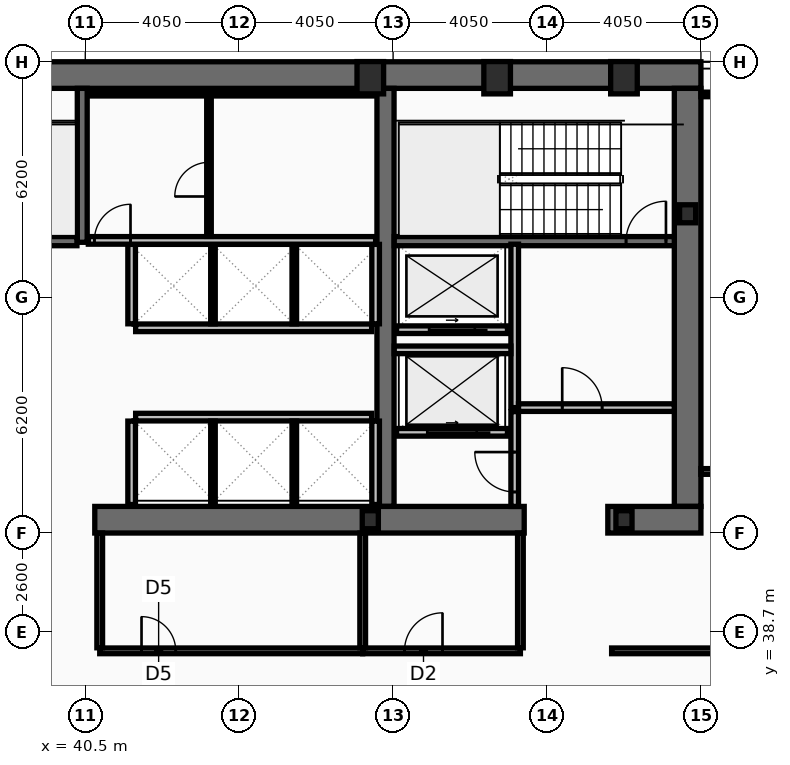
"""IFC4 building model, lengths in metres.
Left out: names, types, materials, properties, quantities, classifications, styles, units other than length and angle.
Written with IfcOpenShell. Run it as: python <this file> out.ifc"""

import sys

from ifc_helpers import new_model, si_unit, direction, frame, frame_2d, origin, origin_2d, place, context, subcontext, project, spatial, rectangle, hollow_rectangle, i_section, extrude, element, fill, save


model = new_model("IFC4")
c1 = context("Model", 3, precision=1e-05, world=origin(), true_north=direction((0.0, 1.0)))
c2 = subcontext(c1, "Body", "Model", "MODEL_VIEW")
j1 = project(units=[si_unit("LENGTHUNIT", "METRE"), si_unit("PLANEANGLEUNIT", "RADIAN")], contexts=[c1])
p1 = place(None, origin())
s1 = spatial("IfcSite", under=j1, at=p1, CompositionType="ELEMENT")
p2 = place(p1, origin())
s2 = spatial("IfcBuilding", under=s1, at=p2, CompositionType="ELEMENT")
p3 = place(p2, frame((0.0, 0.0, 102.6)))
s3 = spatial("IfcBuildingStorey", under=s2, at=p3, CompositionType="ELEMENT", Elevation=102.6)
p4 = place(p3, frame((16.2, 53.35, 0.0), z_axis=(0.0, 0.0, 1.0), x_axis=(1.0, 0.0, 0.0)))
e1 = element("IfcWall", 1, at=p4, inside=s3, PredefinedType="SHEAR", context=c2, shape_type="SweptSolid", body=[
    extrude(rectangle(XDim=40.5, YDim=0.7, at=frame_2d((20.25, 0.0))), origin(), (0.0, 0.0, 1.0), 3.8),
])
p5 = place(p3, frame((56.35, 53.0, 0.0), z_axis=(0.0, 0.0, 1.0), x_axis=(0.0, -1.0, 0.0)))
e2 = element("IfcWall", 2, at=p5, inside=s3, PredefinedType="SHEAR", context=c2, shape_type="SweptSolid", body=[
    extrude(rectangle(XDim=11.0, YDim=0.7, at=frame_2d((5.5, 0.0))), origin(), (0.0, 0.0, 1.0), 3.8),
])
p6 = place(p3, frame((48.4, 42.0, 0.0), z_axis=(0.0, 0.0, 1.0), x_axis=(0.0, 1.0, 0.0)))
e3 = element("IfcWall", 3, at=p6, inside=s3, PredefinedType="SHEAR", context=c2, shape_type="SweptSolid", body=[
    extrude(rectangle(XDim=11.0, YDim=0.45, at=frame_2d((5.5, 0.0))), origin(), (0.0, 0.0, 1.0), 3.8),
])
p7 = place(p3, frame((52.05, 41.65, 0.0), z_axis=(0.0, 0.0, 1.0), x_axis=(-1.0, 0.0, 0.0)))
e4 = element("IfcWall", 4, at=p7, inside=s3, PredefinedType="SHEAR", context=c2, shape_type="SweptSolid", body=[
    extrude(rectangle(XDim=11.3, YDim=0.7, at=frame_2d((5.65, 0.0))), origin(), (0.0, 0.0, 1.0), 3.8),
])
p8 = place(p3, frame((56.7, 41.65, 0.0), z_axis=(0.0, 0.0, 1.0), x_axis=(-1.0, 0.0, 0.0)))
e5 = element("IfcWall", 5, at=p8, inside=s3, PredefinedType="SHEAR", context=c2, shape_type="SweptSolid", body=[
    extrude(rectangle(XDim=2.45, YDim=0.7, at=frame_2d((1.225, 0.0))), origin(), (0.0, 0.0, 1.0), 3.8),
])
p9 = place(p3, frame((40.42, 48.95, 0.0), z_axis=(0.0, 0.0, 1.0), x_axis=(0.0, 1.0, 0.0)))
e6 = element("IfcWall", 6, at=p9, inside=s3, PredefinedType="SHEAR", context=c2, shape_type="SweptSolid", body=[
    extrude(rectangle(XDim=4.05, YDim=0.26, at=frame_2d((2.025, 0.0))), origin(), (0.0, 0.0, 1.0), 3.8),
])
p10 = place(p3, frame((48.63, 48.98, 0.0), z_axis=(0.0, 0.0, 1.0), x_axis=(1.0, 0.0, 0.0)))
e7 = element("IfcWall", 7, at=p10, inside=s3, PredefinedType="SHEAR", context=c2, shape_type="SweptSolid", body=[
    extrude(rectangle(XDim=7.37, YDim=0.24, at=frame_2d((3.685, 0.0))), origin(), (0.0, 0.0, 1.0), 3.8),
])
p11 = place(p10, frame((6.1, 0.0, 0.0)))
e8 = element("IfcOpeningElement", 8, at=p11, cuts=e7, PredefinedType="OPENING", context=c2, shape_type="SweptSolid", body=[
    extrude(rectangle(XDim=1.05, YDim=2.15, at=frame_2d((0.525, 1.075))), frame((0.0, 0.13, 0.0), z_axis=(0.0, -1.0, 0.0), x_axis=(1.0, 0.0, 0.0)), (0.0, 0.0, 1.0), 0.26),
])
p12 = place(p3, frame((32.72, 48.98, 0.0), z_axis=(0.0, 0.0, 1.0), x_axis=(1.0, 0.0, 0.0)))
e9 = element("IfcWall", 9, at=p12, inside=s3, PredefinedType="SHEAR", context=c2, shape_type="SweptSolid", body=[
    extrude(rectangle(XDim=7.56, YDim=0.24, at=frame_2d((3.78, 0.0))), origin(), (0.0, 0.0, 1.0), 3.8),
])
p13 = place(p12, frame((0.22, 0.0, 0.0)))
e10 = element("IfcOpeningElement", 10, at=p13, cuts=e9, PredefinedType="OPENING", context=c2, shape_type="SweptSolid", body=[
    extrude(rectangle(XDim=1.05, YDim=2.15, at=frame_2d((0.525, 1.075))), frame((0.0, 0.13, 0.0), z_axis=(0.0, -1.0, 0.0), x_axis=(1.0, 0.0, 0.0)), (0.0, 0.0, 1.0), 0.26),
])
for number, where, z_axis, x_axis in (
    (11, (48.0, 53.28, 0.0), (0.0, 0.0, 1.0), (1.0, 0.0, 0.0)),
    (12, (51.337, 53.28, 0.0), (0.0, 0.0, 1.0), (1.0, 0.0, 0.0)),
    (13, (54.675, 53.28, 0.0), (0.0, 0.0, 1.0), (1.0, 0.0, 0.0)),
):
    element("IfcColumn", number, at=place(p3, frame(where, z_axis=z_axis, x_axis=x_axis)), inside=s3, PredefinedType="COLUMN", context=c2, shape_type="SweptSolid", body=[
        extrude(hollow_rectangle(XDim=0.7, YDim=0.85, WallThickness=0.05, at=origin_2d()), origin(), (0.0, 0.0, 1.0), 4.0),
    ])
for number, where, z_axis, x_axis in (
    (14, (56.35, 49.7, 0.0), (0.0, 0.0, 1.0), (1.0, 0.0, 0.0)),
    (15, (48.0, 41.65, 0.0), (0.0, 0.0, 1.0), (1.0, 0.0, 0.0)),
    (16, (54.675, 41.65, 0.0), (0.0, 0.0, 1.0), (1.0, 0.0, 0.0)),
):
    element("IfcColumn", number, at=place(p3, frame(where, z_axis=z_axis, x_axis=x_axis)), inside=s3, PredefinedType="COLUMN", context=c2, shape_type="SweptSolid", body=[
        extrude(i_section(OverallWidth=0.424, OverallDepth=0.474, WebThickness=0.048, FlangeThickness=0.077, at=origin_2d()), origin(), (0.0, 0.0, 1.0), 4.0),
    ])
p14 = place(p3, frame((51.61, 43.95, 0.0), z_axis=(0.0, 0.0, 1.0), x_axis=(-1.0, 0.0, 0.0)))
e17 = element("IfcWall", 17, at=p14, inside=s3, PredefinedType="PARTITIONING", context=c2, shape_type="SweptSolid", body=[
    extrude(rectangle(XDim=2.92, YDim=0.2, at=frame_2d((1.46, 0.0))), origin(), (0.0, 0.0, 1.0), 3.8),
])
p15 = place(p14, frame((0.81, 0.0, 0.0)))
e18 = element("IfcOpeningElement", 18, at=p15, cuts=e17, PredefinedType="OPENING", context=c2, shape_type="SweptSolid", body=[
    extrude(rectangle(XDim=1.3, YDim=2.18, at=frame_2d((0.65, 1.09))), frame((0.0, 0.11, 0.0), z_axis=(0.0, -1.0, 0.0), x_axis=(1.0, 0.0, 0.0)), (0.0, 0.0, 1.0), 0.22),
])
p16 = place(p3, frame((51.61, 46.65, 0.0), z_axis=(0.0, 0.0, 1.0), x_axis=(-1.0, 0.0, 0.0)))
e19 = element("IfcWall", 19, at=p16, inside=s3, PredefinedType="PARTITIONING", context=c2, shape_type="SweptSolid", body=[
    extrude(rectangle(XDim=2.92, YDim=0.2, at=frame_2d((1.46, 0.0))), origin(), (0.0, 0.0, 1.0), 3.8),
])
p17 = place(p16, frame((0.86, 0.0, 0.0)))
e20 = element("IfcOpeningElement", 20, at=p17, cuts=e19, PredefinedType="OPENING", context=c2, shape_type="SweptSolid", body=[
    extrude(rectangle(XDim=1.2, YDim=2.18, at=frame_2d((0.6, 1.09))), frame((0.0, 0.11, 0.0), z_axis=(0.0, -1.0, 0.0), x_axis=(1.0, 0.0, 0.0)), (0.0, 0.0, 1.0), 0.22),
])
p18 = place(p3, frame((51.8, 44.6, 0.0), z_axis=(0.0, 0.0, 1.0), x_axis=(0.0, 1.0, 0.0)))
e21 = element("IfcWall", 21, at=p18, inside=s3, PredefinedType="PARTITIONING", context=c2, shape_type="SweptSolid", body=[
    extrude(rectangle(XDim=4.3, YDim=0.2, at=frame_2d((2.15, 0.0))), origin(), (0.0, 0.0, 1.0), 3.8),
])
p19 = place(p3, frame((51.9, 44.6, 0.0), z_axis=(0.0, 0.0, 1.0), x_axis=(1.0, 0.0, 0.0)))
e22 = element("IfcWall", 22, at=p19, inside=s3, PredefinedType="PARTITIONING", context=c2, shape_type="SweptSolid", body=[
    extrude(rectangle(XDim=4.1, YDim=0.2, at=frame_2d((2.05, 0.0))), origin(), (0.0, 0.0, 1.0), 3.8),
])
p20 = place(p19, frame((1.15, 0.0, 0.0)))
e23 = element("IfcOpeningElement", 23, at=p20, cuts=e22, PredefinedType="OPENING", context=c2, shape_type="SweptSolid", body=[
    extrude(rectangle(XDim=1.05, YDim=2.15, at=frame_2d((0.525, 1.075))), frame((0.0, 0.11, 0.0), z_axis=(0.0, -1.0, 0.0), x_axis=(1.0, 0.0, 0.0)), (0.0, 0.0, 1.0), 0.22),
])
p21 = place(p3, frame((48.63, 46.12, 0.0), z_axis=(0.0, 0.0, 1.0), x_axis=(1.0, 0.0, 0.0)))
e24 = element("IfcWall", 24, at=p21, inside=s3, PredefinedType="PARTITIONING", context=c2, shape_type="SweptSolid", body=[
    extrude(rectangle(XDim=3.07, YDim=0.2, at=frame_2d((1.535, 0.0))), origin(), (0.0, 0.0, 1.0), 3.8),
])
p22 = place(p3, frame((51.8, 42.0, 0.0), z_axis=(0.0, 0.0, 1.0), x_axis=(0.0, 1.0, 0.0)))
e25 = element("IfcWall", 25, at=p22, inside=s3, PredefinedType="PARTITIONING", context=c2, shape_type="SweptSolid", body=[
    extrude(rectangle(XDim=2.495, YDim=0.2, at=frame_2d((1.248, 0.0))), origin(), (0.0, 0.0, 1.0), 3.8),
])
p23 = place(p22, frame((0.38, 0.0, 0.0)))
e26 = element("IfcOpeningElement", 26, at=p23, cuts=e25, PredefinedType="OPENING", context=c2, shape_type="SweptSolid", body=[
    extrude(rectangle(XDim=1.05, YDim=2.15, at=frame_2d((0.525, 1.075))), frame((0.0, 0.11, 0.0), z_axis=(0.0, -1.0, 0.0), x_axis=(1.0, 0.0, 0.0)), (0.0, 0.0, 1.0), 0.22),
])
p24 = place(p3, frame((41.825, 46.7, 0.0), z_axis=(0.0, 0.0, 1.0), x_axis=(1.0, 0.0, 0.0)))
e27 = element("IfcWall", 27, at=p24, inside=s3, PredefinedType="PARTITIONING", context=c2, shape_type="SweptSolid", body=[
    extrude(rectangle(XDim=6.21, YDim=0.2, at=frame_2d((3.105, 0.0))), origin(), (0.0, 0.0, 1.0), 3.8),
])
for number, where, z_axis, x_axis in (
    (28, (41.72, 46.805, 0.0), (0.0, 0.0, 1.0), (0.0, 1.0, 0.0)),
    (29, (48.14, 46.805, 0.0), (0.0, 0.0, 1.0), (0.0, 1.0, 0.0)),
):
    element("IfcWall", number, at=place(p3, frame(where, z_axis=z_axis, x_axis=x_axis)), inside=s3, PredefinedType="PARTITIONING", context=c2, shape_type="SweptSolid", body=[
        extrude(rectangle(XDim=2.09, YDim=0.2, at=frame_2d((1.045, 0.0))), origin(), (0.0, 0.0, 1.0), 3.8),
    ])
for number, where, z_axis, x_axis in (
    (30, (43.86, 46.805, 0.0), (0.0, 0.0, 1.0), (0.0, 1.0, 0.0)),
    (31, (46.0, 46.805, 0.0), (0.0, 0.0, 1.0), (0.0, 1.0, 0.0)),
):
    element("IfcWall", number, at=place(p3, frame(where, z_axis=z_axis, x_axis=x_axis)), inside=s3, PredefinedType="PARTITIONING", context=c2, shape_type="SweptSolid", body=[
        extrude(rectangle(XDim=2.09, YDim=0.12, at=frame_2d((1.045, 0.0))), origin(), (0.0, 0.0, 1.0), 3.8),
    ])
p25 = place(p3, frame((41.825, 44.35, 0.0), z_axis=(0.0, 0.0, 1.0), x_axis=(1.0, 0.0, 0.0)))
e32 = element("IfcWall", 32, at=p25, inside=s3, PredefinedType="PARTITIONING", context=c2, shape_type="SweptSolid", body=[
    extrude(rectangle(XDim=6.21, YDim=0.2, at=frame_2d((3.105, 0.0))), origin(), (0.0, 0.0, 1.0), 3.8),
])
for number, where, z_axis, x_axis in (
    (33, (41.72, 42.05, 0.0), (0.0, 0.0, 1.0), (0.0, 1.0, 0.0)),
    (34, (48.14, 42.05, 0.0), (0.0, 0.0, 1.0), (0.0, 1.0, 0.0)),
):
    element("IfcWall", number, at=place(p3, frame(where, z_axis=z_axis, x_axis=x_axis)), inside=s3, PredefinedType="PARTITIONING", context=c2, shape_type="SweptSolid", body=[
        extrude(rectangle(XDim=2.195, YDim=0.2, at=frame_2d((1.098, 0.0))), origin(), (0.0, 0.0, 1.0), 3.8),
    ])
for number, where, z_axis, x_axis in (
    (35, (43.86, 42.05, 0.0), (0.0, 0.0, 1.0), (0.0, 1.0, 0.0)),
    (36, (46.0, 42.05, 0.0), (0.0, 0.0, 1.0), (0.0, 1.0, 0.0)),
):
    element("IfcWall", number, at=place(p3, frame(where, z_axis=z_axis, x_axis=x_axis)), inside=s3, PredefinedType="PARTITIONING", context=c2, shape_type="SweptSolid", body=[
        extrude(rectangle(XDim=2.195, YDim=0.12, at=frame_2d((1.098, 0.0))), origin(), (0.0, 0.0, 1.0), 3.8),
    ])
p26 = place(p3, frame((40.58, 52.86, 0.0), z_axis=(0.0, 0.0, 1.0), x_axis=(1.0, 0.0, 0.0)))
e37 = element("IfcWall", 37, at=p26, inside=s3, PredefinedType="PARTITIONING", context=c2, shape_type="SweptSolid", body=[
    extrude(rectangle(XDim=7.56, YDim=0.12, at=frame_2d((3.78, 0.0))), origin(), (0.0, 0.0, 1.0), 3.8),
])
p27 = place(p3, frame((40.58, 49.0, 0.0), z_axis=(0.0, 0.0, 1.0), x_axis=(1.0, 0.0, 0.0)))
e38 = element("IfcWall", 38, at=p27, inside=s3, PredefinedType="PARTITIONING", context=c2, shape_type="SweptSolid", body=[
    extrude(rectangle(XDim=7.56, YDim=0.2, at=frame_2d((3.78, 0.0))), origin(), (0.0, 0.0, 1.0), 3.8),
])
p28 = place(p27, frame((0.16, 0.0, 0.0)))
e39 = element("IfcOpeningElement", 39, at=p28, cuts=e38, PredefinedType="OPENING", context=c2, shape_type="SweptSolid", body=[
    extrude(rectangle(XDim=0.95, YDim=2.1, at=frame_2d((0.475, 1.05))), frame((0.0, 0.11, 0.0), z_axis=(0.0, -1.0, 0.0), x_axis=(1.0, 0.0, 0.0)), (0.0, 0.0, 1.0), 0.22),
])
p29 = place(p3, frame((43.755, 49.105, 0.0), z_axis=(0.0, 0.0, 1.0), x_axis=(0.0, 1.0, 0.0)))
e40 = element("IfcWall", 40, at=p29, inside=s3, PredefinedType="PARTITIONING", context=c2, shape_type="SweptSolid", body=[
    extrude(rectangle(XDim=3.69, YDim=0.12, at=frame_2d((1.845, 0.0))), origin(), (0.0, 0.0, 1.0), 3.8),
])
p30 = place(p29, frame((1.05, 0.0, 0.0)))
e41 = element("IfcOpeningElement", 41, at=p30, cuts=e40, PredefinedType="OPENING", context=c2, shape_type="SweptSolid", body=[
    extrude(rectangle(XDim=0.9, YDim=2.05, at=frame_2d((0.45, 1.025))), frame((0.0, 0.07, 0.0), z_axis=(0.0, -1.0, 0.0), x_axis=(1.0, 0.0, 0.0)), (0.0, 0.0, 1.0), 0.14),
])
p31 = place(p3, frame((40.88, 38.2, 0.0), z_axis=(0.0, 0.0, 1.0), x_axis=(1.0, 0.0, 0.0)))
e42 = element("IfcWall", 42, at=p31, inside=s3, PredefinedType="PARTITIONING", context=c2, shape_type="SweptSolid", body=[
    extrude(rectangle(XDim=6.92, YDim=0.15, at=frame_2d((3.46, 0.0))), origin(), (0.0, 0.0, 1.0), 2.99),
])
p32 = place(p31, frame((1.1, 0.0, 0.0)))
e43 = element("IfcOpeningElement", 43, at=p32, cuts=e42, PredefinedType="OPENING", context=c2, shape_type="SweptSolid", body=[
    extrude(rectangle(XDim=0.9, YDim=2.05, at=frame_2d((0.45, 1.025))), frame((0.0, 0.085, 0.0), z_axis=(0.0, -1.0, 0.0), x_axis=(1.0, 0.0, 0.0)), (0.0, 0.0, 1.0), 0.17),
])
p33 = place(p3, frame((47.8, 38.2, 0.0), z_axis=(0.0, 0.0, 1.0), x_axis=(1.0, 0.0, 0.0)))
e44 = element("IfcWall", 44, at=p33, inside=s3, PredefinedType="PARTITIONING", context=c2, shape_type="SweptSolid", body=[
    extrude(rectangle(XDim=4.15, YDim=0.15, at=frame_2d((2.075, 0.0))), origin(), (0.0, 0.0, 1.0), 2.99),
])
p34 = place(p33, frame((1.1, 0.0, 0.0)))
e45 = element("IfcOpeningElement", 45, at=p34, cuts=e44, PredefinedType="OPENING", context=c2, shape_type="SweptSolid", body=[
    extrude(rectangle(XDim=1.0, YDim=2.05, at=frame_2d((0.5, 1.025))), frame((0.0, 0.085, 0.0), z_axis=(0.0, -1.0, 0.0), x_axis=(1.0, 0.0, 0.0)), (0.0, 0.0, 1.0), 0.17),
])
p35 = place(p3, frame((40.88, 38.28, 0.0), z_axis=(0.0, 0.0, 1.0), x_axis=(0.0, 1.0, 0.0)))
e46 = element("IfcWall", 46, at=p35, inside=s3, PredefinedType="PARTITIONING", context=c2, shape_type="SweptSolid", body=[
    extrude(rectangle(XDim=3.02, YDim=0.15, at=frame_2d((1.51, 0.0))), origin(), (0.0, 0.0, 1.0), 3.8),
])
p36 = place(p3, frame((47.8, 38.28, 0.0), z_axis=(0.0, 0.0, 1.0), x_axis=(0.0, 1.0, 0.0)))
e47 = element("IfcWall", 47, at=p36, inside=s3, PredefinedType="PARTITIONING", context=c2, shape_type="SweptSolid", body=[
    extrude(rectangle(XDim=3.02, YDim=0.15, at=frame_2d((1.51, 0.0))), origin(), (0.0, 0.0, 1.0), 2.99),
])
p37 = place(p3, frame((51.95, 38.28, 0.0), z_axis=(0.0, 0.0, 1.0), x_axis=(0.0, 1.0, 0.0)))
e48 = element("IfcWall", 48, at=p37, inside=s3, PredefinedType="PARTITIONING", context=c2, shape_type="SweptSolid", body=[
    extrude(rectangle(XDim=3.02, YDim=0.15, at=frame_2d((1.51, 0.0))), origin(), (0.0, 0.0, 1.0), 3.8),
])
p38 = place(p3, frame((54.35, 38.2, 0.0), z_axis=(0.0, 0.0, 1.0), x_axis=(1.0, 0.0, 0.0)))
e49 = element("IfcWall", 49, at=p38, inside=s3, PredefinedType="PARTITIONING", context=c2, shape_type="SweptSolid", body=[
    extrude(rectangle(XDim=14.52, YDim=0.15, at=frame_2d((7.26, 0.0))), origin(), (0.0, 0.0, 1.0), 2.99),
])
p39 = place(p38, frame((3.25, 0.0, 0.0)))
e50 = element("IfcOpeningElement", 50, at=p39, cuts=e49, PredefinedType="OPENING", context=c2, shape_type="SweptSolid", body=[
    extrude(rectangle(XDim=0.95, YDim=2.05, at=frame_2d((0.475, 1.025))), frame((0.0, 0.085, 0.0), z_axis=(0.0, -1.0, 0.0), x_axis=(1.0, 0.0, 0.0)), (0.0, 0.0, 1.0), 0.17),
])
p40 = place(p3, frame((56.7, 42.92, 0.0), z_axis=(0.0, 0.0, 1.0), x_axis=(1.0, 0.0, 0.0)))
e51 = element("IfcWall", 51, at=p40, inside=s3, PredefinedType="PARTITIONING", context=c2, shape_type="SweptSolid", body=[
    extrude(rectangle(XDim=12.105, YDim=0.15, at=frame_2d((6.052, 0.0))), origin(), (0.0, 0.0, 1.0), 2.99),
])
p41 = place(p40, frame((0.9, 0.0, 0.0)))
e52 = element("IfcOpeningElement", 52, at=p41, cuts=e51, PredefinedType="OPENING", context=c2, shape_type="SweptSolid", body=[
    extrude(rectangle(XDim=0.9, YDim=2.05, at=frame_2d((0.45, 1.025))), frame((0.0, 0.085, 0.0), z_axis=(0.0, -1.0, 0.0), x_axis=(1.0, 0.0, 0.0)), (0.0, 0.0, 1.0), 0.17),
])
p42 = place(p3, frame((56.7, 52.84, 0.0), z_axis=(0.0, 0.0, 1.0), x_axis=(1.0, 0.0, 0.0)))
e53 = element("IfcWall", 53, at=p42, inside=s3, PredefinedType="PARTITIONING", context=c2, shape_type="SweptSolid", body=[
    extrude(rectangle(XDim=12.105, YDim=0.12, at=frame_2d((6.052, 0.0))), origin(), (0.0, 0.0, 1.0), 3.8),
])
p43 = place(p11, origin())
e54 = element("IfcDoor", 54, at=p43, inside=s3, OperationType="SINGLE_SWING_RIGHT", PredefinedType="DOOR", context=c2, shape_type="SweptSolid", body=[
    extrude(rectangle(XDim=1.05, YDim=2.15, at=frame_2d((0.525, 1.075))), frame((0.0, 0.025, 0.0), z_axis=(0.0, -1.0, 0.0), x_axis=(1.0, 0.0, 0.0)), (0.0, 0.0, 1.0), 0.05),
])
fill(e8, e54)
p44 = place(p15, origin())
e55 = element("IfcDoor", 55, at=p44, inside=s3, OperationType="SLIDING_TO_LEFT", PredefinedType="DOOR", context=c2, shape_type="SweptSolid", body=[
    extrude(rectangle(XDim=1.3, YDim=2.18, at=frame_2d((0.65, 1.09))), frame((0.0, 0.025, 0.0), z_axis=(0.0, -1.0, 0.0), x_axis=(1.0, 0.0, 0.0)), (0.0, 0.0, 1.0), 0.05),
])
fill(e18, e55)
p45 = place(p17, origin())
e56 = element("IfcDoor", 56, at=p45, inside=s3, OperationType="SLIDING_TO_LEFT", PredefinedType="DOOR", context=c2, shape_type="SweptSolid", body=[
    extrude(rectangle(XDim=1.2, YDim=2.18, at=frame_2d((0.6, 1.09))), frame((0.0, 0.025, 0.0), z_axis=(0.0, -1.0, 0.0), x_axis=(1.0, 0.0, 0.0)), (0.0, 0.0, 1.0), 0.05),
])
fill(e20, e56)
p46 = place(p20, origin())
e57 = element("IfcDoor", 57, at=p46, inside=s3, OperationType="SINGLE_SWING_LEFT", PredefinedType="DOOR", context=c2, shape_type="SweptSolid", body=[
    extrude(rectangle(XDim=1.05, YDim=2.15, at=frame_2d((0.525, 1.075))), frame((0.0, 0.025, 0.0), z_axis=(0.0, -1.0, 0.0), x_axis=(1.0, 0.0, 0.0)), (0.0, 0.0, 1.0), 0.05),
])
fill(e23, e57)
p47 = place(p23, origin())
e58 = element("IfcDoor", 58, at=p47, inside=s3, OperationType="SINGLE_SWING_RIGHT", PredefinedType="DOOR", context=c2, shape_type="SweptSolid", body=[
    extrude(rectangle(XDim=1.05, YDim=2.15, at=frame_2d((0.525, 1.075))), frame((0.0, 0.025, 0.0), z_axis=(0.0, -1.0, 0.0), x_axis=(1.0, 0.0, 0.0)), (0.0, 0.0, 1.0), 0.05),
])
fill(e26, e58)
p48 = place(p28, origin())
e59 = element("IfcDoor", 59, at=p48, inside=s3, OperationType="SINGLE_SWING_RIGHT", PredefinedType="DOOR", context=c2, shape_type="SweptSolid", body=[
    extrude(rectangle(XDim=0.95, YDim=2.1, at=frame_2d((0.475, 1.05))), frame((0.0, 0.025, 0.0), z_axis=(0.0, -1.0, 0.0), x_axis=(1.0, 0.0, 0.0)), (0.0, 0.0, 1.0), 0.05),
])
fill(e39, e59)
p49 = place(p30, origin())
e60 = element("IfcDoor", 60, at=p49, inside=s3, OperationType="SINGLE_SWING_LEFT", PredefinedType="DOOR", context=c2, shape_type="SweptSolid", body=[
    extrude(rectangle(XDim=0.9, YDim=2.05, at=frame_2d((0.45, 1.025))), frame((0.0, 0.025, 0.0), z_axis=(0.0, -1.0, 0.0), x_axis=(1.0, 0.0, 0.0)), (0.0, 0.0, 1.0), 0.05),
])
fill(e41, e60)
p50 = place(p32, origin())
e61 = element("IfcDoor", 61, at=p50, inside=s3, OperationType="SINGLE_SWING_LEFT", PredefinedType="DOOR", context=c2, shape_type="SweptSolid", body=[
    extrude(rectangle(XDim=0.9, YDim=2.05, at=frame_2d((0.45, 1.025))), frame((0.0, 0.025, 0.0), z_axis=(0.0, -1.0, 0.0), x_axis=(1.0, 0.0, 0.0)), (0.0, 0.0, 1.0), 0.05),
])
fill(e43, e61)
p51 = place(p34, origin())
e62 = element("IfcDoor", 62, at=p51, inside=s3, OperationType="SINGLE_SWING_RIGHT", PredefinedType="DOOR", context=c2, shape_type="SweptSolid", body=[
    extrude(rectangle(XDim=1.0, YDim=2.05, at=frame_2d((0.5, 1.025))), frame((0.0, 0.025, 0.0), z_axis=(0.0, -1.0, 0.0), x_axis=(1.0, 0.0, 0.0)), (0.0, 0.0, 1.0), 0.05),
])
fill(e45, e62)
save(model, sys.argv[1])
